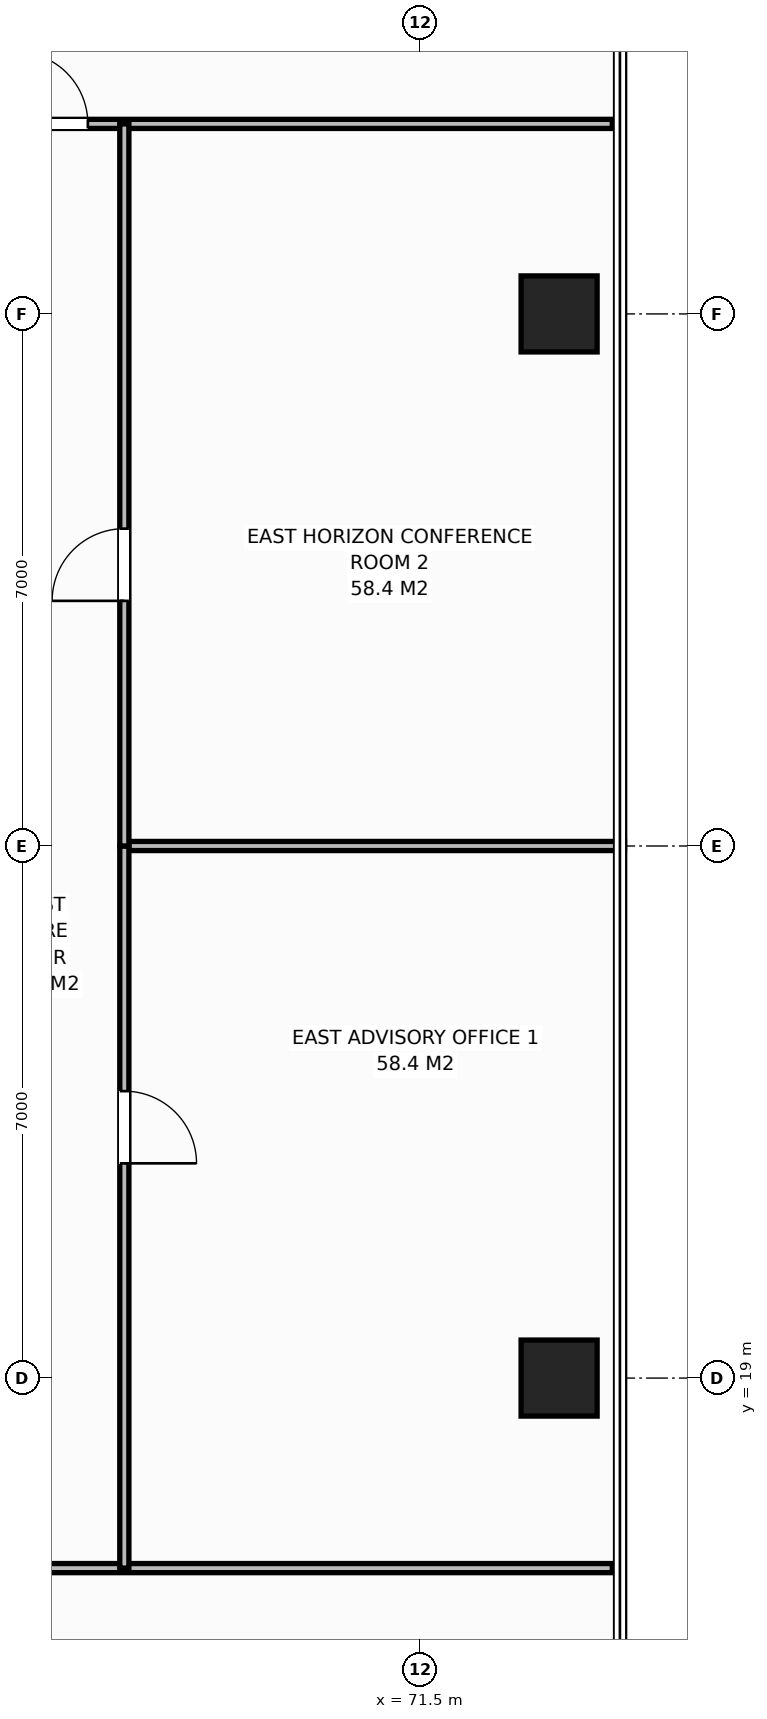
"""IFC4 building model, lengths in metres.
Left out: names, types, materials, properties, quantities, classifications, styles, units other than length and angle.
Written with IfcOpenShell. Run it as: python <this file> out.ifc"""

import sys

from ifc_helpers import new_model, si_unit, direction, frame, frame_2d, origin, origin_2d, place, context, subcontext, project, spatial, rectangle, extrude, element, fill, save


model = new_model("IFC4")
c1 = context("Model", 3, precision=1e-05, world=origin(), true_north=direction((0.0, 1.0)))
c2 = subcontext(c1, "Body", "Model", "MODEL_VIEW")
j1 = project(units=[si_unit("LENGTHUNIT", "METRE"), si_unit("PLANEANGLEUNIT", "RADIAN")], contexts=[c1])
p1 = place(None, origin())
s1 = spatial("IfcSite", under=j1, at=p1, CompositionType="ELEMENT")
p2 = place(p1, origin())
s2 = spatial("IfcBuilding", under=s1, at=p2, CompositionType="ELEMENT")
p3 = place(p2, frame((0.0, 0.0, 167.0)))
s3 = spatial("IfcBuildingStorey", under=s2, at=p3, CompositionType="ELEMENT", Elevation=167.0)
for number, where, z_axis, x_axis in (
    (1, (73.32, 19.0, 0.0), (0.0, 0.0, 1.0), (1.0, 0.0, 0.0)),
    (2, (73.32, 33.0, 0.0), (0.0, 0.0, 1.0), (1.0, 0.0, 0.0)),
):
    element("IfcColumn", number, at=place(p3, frame(where, z_axis=z_axis, x_axis=x_axis)), inside=s3, PredefinedType="COLUMN", context=c2, shape_type="SweptSolid", body=[
        extrude(rectangle(XDim=1.0, YDim=1.0, at=origin_2d()), origin(), (0.0, 0.0, 1.0), 3.8),
    ])
p4 = place(p3, frame((64.86, 35.5, 0.0), z_axis=(0.0, 0.0, 1.0), x_axis=(1.0, 0.0, 0.0)))
e3 = element("IfcWall", 3, at=p4, inside=s3, PredefinedType="PARTITIONING", context=c2, shape_type="SweptSolid", body=[
    extrude(rectangle(XDim=9.16, YDim=0.12, at=frame_2d((4.58, 0.0))), origin(), (0.0, 0.0, 1.0), 3.572),
])
p5 = place(p4, frame((1.31, 0.0, 0.0)))
e4 = element("IfcOpeningElement", 4, at=p5, cuts=e3, PredefinedType="OPENING", context=c2, shape_type="SweptSolid", body=[
    extrude(rectangle(XDim=0.95, YDim=2.15, at=frame_2d((0.475, 1.075))), frame((0.0, 0.07, 0.0), z_axis=(0.0, -1.0, 0.0), x_axis=(1.0, 0.0, 0.0)), (0.0, 0.0, 1.0), 0.14),
])
p6 = place(p3, frame((61.704, 16.5, 0.0), z_axis=(0.0, 0.0, 1.0), x_axis=(1.0, 0.0, 0.0)))
e5 = element("IfcWall", 5, at=p6, inside=s3, PredefinedType="PARTITIONING", context=c2, shape_type="SweptSolid", body=[
    extrude(rectangle(XDim=12.316, YDim=0.12, at=frame_2d((6.158, 0.0))), origin(), (0.0, 0.0, 1.0), 3.572),
])
p7 = place(p6, frame((0.48, 0.0, 0.0)))
e6 = element("IfcOpeningElement", 6, at=p7, cuts=e5, PredefinedType="OPENING", context=c2, shape_type="SweptSolid", body=[
    extrude(rectangle(XDim=0.95, YDim=2.15, at=frame_2d((0.475, 1.075))), frame((0.0, 0.07, 0.0), z_axis=(0.0, -1.0, 0.0), x_axis=(1.0, 0.0, 0.0)), (0.0, 0.0, 1.0), 0.14),
])
p8 = place(p3, frame((67.6, 26.0, 0.0), z_axis=(0.0, 0.0, 1.0), x_axis=(1.0, 0.0, 0.0)))
e7 = element("IfcWall", 7, at=p8, inside=s3, PredefinedType="PARTITIONING", context=c2, shape_type="SweptSolid", body=[
    extrude(rectangle(XDim=6.58, YDim=0.12, at=frame_2d((3.29, 0.0))), origin(), (0.0, 0.0, 1.0), 3.572),
])
p9 = place(p3, frame((67.6, 16.5, 0.0), z_axis=(0.0, 0.0, 1.0), x_axis=(0.0, 1.0, 0.0)))
e8 = element("IfcWall", 8, at=p9, inside=s3, PredefinedType="PARTITIONING", context=c2, shape_type="SweptSolid", body=[
    extrude(rectangle(XDim=9.5, YDim=0.12, at=frame_2d((4.75, 0.0))), origin(), (0.0, 0.0, 1.0), 3.572),
])
p10 = place(p9, frame((5.325, 0.0, 0.0)))
e9 = element("IfcOpeningElement", 9, at=p10, cuts=e8, PredefinedType="OPENING", context=c2, shape_type="SweptSolid", body=[
    extrude(rectangle(XDim=0.95, YDim=2.15, at=frame_2d((0.475, 1.075))), frame((0.0, 0.07, 0.0), z_axis=(0.0, -1.0, 0.0), x_axis=(1.0, 0.0, 0.0)), (0.0, 0.0, 1.0), 0.14),
])
p11 = place(p3, frame((67.6, 26.0, 0.0), z_axis=(0.0, 0.0, 1.0), x_axis=(0.0, 1.0, 0.0)))
e10 = element("IfcWall", 10, at=p11, inside=s3, PredefinedType="PARTITIONING", context=c2, shape_type="SweptSolid", body=[
    extrude(rectangle(XDim=9.5, YDim=0.12, at=frame_2d((4.75, 0.0))), origin(), (0.0, 0.0, 1.0), 3.572),
])
p12 = place(p11, frame((3.225, 0.0, 0.0)))
e11 = element("IfcOpeningElement", 11, at=p12, cuts=e10, PredefinedType="OPENING", context=c2, shape_type="SweptSolid", body=[
    extrude(rectangle(XDim=0.95, YDim=2.15, at=frame_2d((0.475, 1.075))), frame((0.0, 0.07, 0.0), z_axis=(0.0, -1.0, 0.0), x_axis=(1.0, 0.0, 0.0)), (0.0, 0.0, 1.0), 0.14),
])
p13 = place(p5, origin())
e12 = element("IfcDoor", 12, at=p13, inside=s3, OperationType="SINGLE_SWING_LEFT", PredefinedType="DOOR", context=c2, shape_type="SweptSolid", body=[
    extrude(rectangle(XDim=0.95, YDim=2.15, at=frame_2d((0.475, 1.075))), frame((0.0, 0.025, 0.0), z_axis=(0.0, -1.0, 0.0), x_axis=(1.0, 0.0, 0.0)), (0.0, 0.0, 1.0), 0.05),
])
fill(e4, e12)
p14 = place(p10, origin())
e13 = element("IfcDoor", 13, at=p14, inside=s3, OperationType="SINGLE_SWING_RIGHT", PredefinedType="DOOR", context=c2, shape_type="SweptSolid", body=[
    extrude(rectangle(XDim=0.95, YDim=2.15, at=frame_2d((0.475, 1.075))), frame((0.0, 0.025, 0.0), z_axis=(0.0, -1.0, 0.0), x_axis=(1.0, 0.0, 0.0)), (0.0, 0.0, 1.0), 0.05),
])
fill(e9, e13)
p15 = place(p12, origin())
e14 = element("IfcDoor", 14, at=p15, inside=s3, OperationType="SINGLE_SWING_LEFT", PredefinedType="DOOR", context=c2, shape_type="SweptSolid", body=[
    extrude(rectangle(XDim=0.95, YDim=2.15, at=frame_2d((0.475, 1.075))), frame((0.0, 0.025, 0.0), z_axis=(0.0, -1.0, 0.0), x_axis=(1.0, 0.0, 0.0)), (0.0, 0.0, 1.0), 0.05),
])
fill(e11, e14)
save(model, sys.argv[1])
